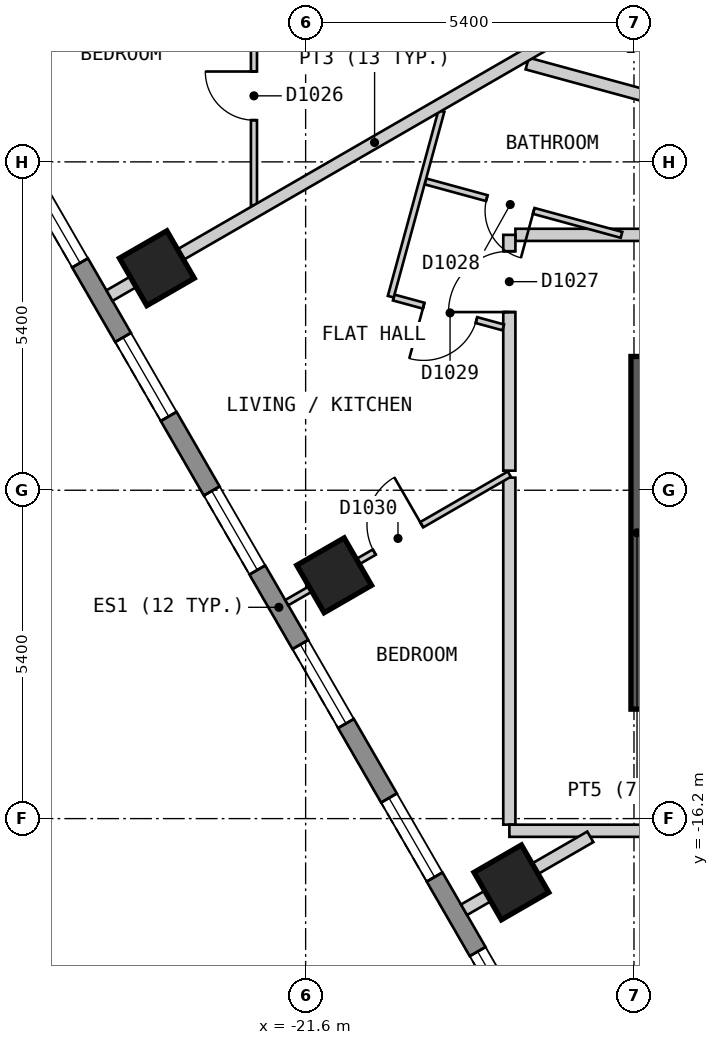
"""IFC4 building model, lengths in metres.
Left out: names, types, materials, properties, quantities, classifications, styles, units other than length and angle.
Written with IfcOpenShell. Run it as: python <this file> out.ifc"""

import sys

from ifc_helpers import new_model, si_unit, direction, frame, frame_2d, origin, origin_2d, place, context, subcontext, project, spatial, polyline, rectangle, outline, extrude, element, fill, save


model = new_model("IFC4")
c1 = context("Model", 3, precision=1e-05, world=origin(), true_north=direction((0.0, 1.0)))
c2 = subcontext(c1, "Body", "Model", "MODEL_VIEW")
j1 = project(units=[si_unit("LENGTHUNIT", "METRE"), si_unit("PLANEANGLEUNIT", "RADIAN")], contexts=[c1])
p1 = place(None, origin())
s1 = spatial("IfcSite", under=j1, at=p1, CompositionType="ELEMENT")
p2 = place(p1, origin())
s2 = spatial("IfcBuilding", under=s1, at=p2, CompositionType="ELEMENT")
p3 = place(p2, frame((0.0, 0.0, 126.6)))
s3 = spatial("IfcBuildingStorey", under=s2, at=p3, CompositionType="ELEMENT", Elevation=126.6)
for number, where, z_axis, x_axis in (
    (1, (-24.047, -7.149, 0.0), (0.0, 0.0, 1.0), (0.5, -0.866, 0.0)),
    (2, (-21.131, -12.199, 0.0), (0.0, 0.0, 1.0), (0.5, -0.866, 0.0)),
    (3, (-18.216, -17.249, 0.0), (0.0, 0.0, 1.0), (0.5, -0.866, 0.0)),
):
    element("IfcColumn", number, at=place(p3, frame(where, z_axis=z_axis, x_axis=x_axis)), inside=s3, PredefinedType="COLUMN", context=c2, shape_type="SweptSolid", body=[
        extrude(rectangle(XDim=0.9, YDim=0.9, at=origin_2d()), origin(), (0.0, 0.0, 1.0), 3.0),
    ])
p4 = place(p3, frame((-28.218, -2.025, 0.0), z_axis=(0.0, 0.0, 1.0), x_axis=(0.500017503135, -0.866015298109, 0.0)))
e4 = element("IfcWall", 4, at=p4, inside=s3, PredefinedType="SOLIDWALL", context=c2, shape_type="SweptSolid", body=[
    extrude(outline(polyline([(0.0, -0.15), (24.711, -0.15), (24.631, 0.15), (0.08, 0.15), (0.0, -0.15)])), origin(), (0.0, 0.0, 1.0), 2.7),
])
p5 = place(p4, frame((1.4, 0.0, 0.15)))
e5 = element("IfcOpeningElement", 5, at=p5, cuts=e4, PredefinedType="OPENING", context=c2, shape_type="SweptSolid", body=[
    extrude(rectangle(XDim=1.5, YDim=2.1, at=frame_2d((0.75, 1.05))), frame((0.0, 0.16, 0.0), z_axis=(0.0, -1.0, 0.0), x_axis=(1.0, 0.0, 0.0)), (0.0, 0.0, 1.0), 0.32),
])
p6 = place(p4, frame((4.316, 0.0, 0.15)))
e6 = element("IfcOpeningElement", 6, at=p6, cuts=e4, PredefinedType="OPENING", context=c2, shape_type="SweptSolid", body=[
    extrude(rectangle(XDim=1.5, YDim=2.1, at=frame_2d((0.75, 1.05))), frame((0.0, 0.16, 0.0), z_axis=(0.0, -1.0, 0.0), x_axis=(1.0, 0.0, 0.0)), (0.0, 0.0, 1.0), 0.32),
])
p7 = place(p4, frame((7.231, 0.0, 0.15)))
e7 = element("IfcOpeningElement", 7, at=p7, cuts=e4, PredefinedType="OPENING", context=c2, shape_type="SweptSolid", body=[
    extrude(rectangle(XDim=1.5, YDim=2.1, at=frame_2d((0.75, 1.05))), frame((0.0, 0.16, 0.0), z_axis=(0.0, -1.0, 0.0), x_axis=(1.0, 0.0, 0.0)), (0.0, 0.0, 1.0), 0.32),
])
p8 = place(p4, frame((10.147, 0.0, 0.15)))
e8 = element("IfcOpeningElement", 8, at=p8, cuts=e4, PredefinedType="OPENING", context=c2, shape_type="SweptSolid", body=[
    extrude(rectangle(XDim=1.5, YDim=2.1, at=frame_2d((0.75, 1.05))), frame((0.0, 0.16, 0.0), z_axis=(0.0, -1.0, 0.0), x_axis=(1.0, 0.0, 0.0)), (0.0, 0.0, 1.0), 0.32),
])
p9 = place(p4, frame((13.062, 0.0, 0.15)))
e9 = element("IfcOpeningElement", 9, at=p9, cuts=e4, PredefinedType="OPENING", context=c2, shape_type="SweptSolid", body=[
    extrude(rectangle(XDim=1.5, YDim=2.1, at=frame_2d((0.75, 1.05))), frame((0.0, 0.16, 0.0), z_axis=(0.0, -1.0, 0.0), x_axis=(1.0, 0.0, 0.0)), (0.0, 0.0, 1.0), 0.32),
])
p10 = place(p4, frame((15.977, 0.0, 0.15)))
e10 = element("IfcOpeningElement", 10, at=p10, cuts=e4, PredefinedType="OPENING", context=c2, shape_type="SweptSolid", body=[
    extrude(rectangle(XDim=1.5, YDim=2.1, at=frame_2d((0.75, 1.05))), frame((0.0, 0.16, 0.0), z_axis=(0.0, -1.0, 0.0), x_axis=(1.0, 0.0, 0.0)), (0.0, 0.0, 1.0), 0.32),
])
p11 = place(p4, frame((18.893, 0.0, 0.15)))
e11 = element("IfcOpeningElement", 11, at=p11, cuts=e4, PredefinedType="OPENING", context=c2, shape_type="SweptSolid", body=[
    extrude(rectangle(XDim=1.5, YDim=2.1, at=frame_2d((0.75, 1.05))), frame((0.0, 0.16, 0.0), z_axis=(0.0, -1.0, 0.0), x_axis=(1.0, 0.0, 0.0)), (0.0, 0.0, 1.0), 0.32),
])
p12 = place(p4, frame((21.809, 0.0, 0.15)))
e12 = element("IfcOpeningElement", 12, at=p12, cuts=e4, PredefinedType="OPENING", context=c2, shape_type="SweptSolid", body=[
    extrude(rectangle(XDim=1.5, YDim=2.1, at=frame_2d((0.75, 1.05))), frame((0.0, 0.16, 0.0), z_axis=(0.0, -1.0, 0.0), x_axis=(1.0, 0.0, 0.0)), (0.0, 0.0, 1.0), 0.32),
])
p13 = place(p3, frame((-18.25, -10.593, 0.0), z_axis=(0.0, 0.0, 1.0), x_axis=(0.0, -1.0, 0.0)))
e13 = element("IfcWall", 13, at=p13, inside=s3, PredefinedType="PARTITIONING", context=c2, shape_type="SweptSolid", body=[
    extrude(rectangle(XDim=5.706, YDim=0.2, at=frame_2d((2.853, 0.0))), origin(), (0.0, 0.0, 1.0), 2.7),
])
p14 = place(p3, frame((-18.15, -6.6, 0.0), z_axis=(0.0, 0.0, 1.0), x_axis=(1.0, 0.0, 0.0)))
e14 = element("IfcWall", 14, at=p14, inside=s3, PredefinedType="PARTITIONING", context=c2, shape_type="SweptSolid", body=[
    extrude(rectangle(XDim=2.55, YDim=0.2, at=frame_2d((1.275, 0.0))), origin(), (0.0, 0.0, 1.0), 2.7),
])
p15 = place(p3, frame((-18.249, -16.4, 0.0), z_axis=(0.0, 0.0, 1.0), x_axis=(1.0, 0.0, 0.0)))
e15 = element("IfcWall", 15, at=p15, inside=s3, PredefinedType="PARTITIONING", context=c2, shape_type="SweptSolid", body=[
    extrude(rectangle(XDim=2.749, YDim=0.2, at=frame_2d((1.375, 0.0))), origin(), (0.0, 0.0, 1.0), 2.7),
])
p16 = place(p3, frame((-18.25, -10.478, 0.0), z_axis=(0.0, 0.0, 1.0), x_axis=(0.0, 1.0, 0.0)))
e16 = element("IfcWall", 16, at=p16, inside=s3, PredefinedType="PARTITIONING", context=c2, shape_type="SweptSolid", body=[
    extrude(rectangle(XDim=3.878, YDim=0.2, at=frame_2d((1.939, 0.0))), origin(), (0.0, 0.0, 1.0), 2.7),
])
p17 = place(p16, frame((2.608, 0.0, 0.0)))
e17 = element("IfcOpeningElement", 17, at=p17, cuts=e16, PredefinedType="OPENING", context=c2, shape_type="SweptSolid", body=[
    extrude(rectangle(XDim=1.0, YDim=2.1, at=frame_2d((0.5, 1.05))), frame((0.0, 0.11, 0.0), z_axis=(0.0, -1.0, 0.0), x_axis=(1.0, 0.0, 0.0)), (0.0, 0.0, 1.0), 0.22),
])
p18 = place(p3, frame((-19.631, -5.721, 0.0), z_axis=(0.0, 0.0, 1.0), x_axis=(0.964816035809, -0.262925877475, 0.0)))
e18 = element("IfcWall", 18, at=p18, inside=s3, PredefinedType="PARTITIONING", context=c2, shape_type="SweptSolid", body=[
    extrude(rectangle(XDim=3.344, YDim=0.1, at=frame_2d((1.672, 0.0))), origin(), (0.0, 0.0, 1.0), 2.7),
])
p19 = place(p18, frame((1.047, 0.0, 0.0)))
e19 = element("IfcOpeningElement", 19, at=p19, cuts=e18, PredefinedType="OPENING", context=c2, shape_type="SweptSolid", body=[
    extrude(rectangle(XDim=0.8, YDim=2.1, at=frame_2d((0.4, 1.05))), frame((0.0, 0.06, 0.0), z_axis=(0.0, -1.0, 0.0), x_axis=(1.0, 0.0, 0.0)), (0.0, 0.0, 1.0), 0.12),
])
p20 = place(p3, frame((-20.151, -7.631, 0.0), z_axis=(0.0, 0.0, 1.0), x_axis=(0.964784947449, -0.263039930765, 0.0)))
e20 = element("IfcWall", 20, at=p20, inside=s3, PredefinedType="PARTITIONING", context=c2, shape_type="SweptSolid", body=[
    extrude(rectangle(XDim=1.866, YDim=0.1, at=frame_2d((0.933, 0.0))), origin(), (0.0, 0.0, 1.0), 2.7),
])
p21 = place(p20, frame((0.51, 0.0, 0.0)))
e21 = element("IfcOpeningElement", 21, at=p21, cuts=e20, PredefinedType="OPENING", context=c2, shape_type="SweptSolid", body=[
    extrude(rectangle(XDim=0.9, YDim=2.1, at=frame_2d((0.45, 1.05))), frame((0.0, 0.06, 0.0), z_axis=(0.0, -1.0, 0.0), x_axis=(1.0, 0.0, 0.0)), (0.0, 0.0, 1.0), 0.12),
])
p22 = place(p3, frame((-20.2, -7.617, 0.0), z_axis=(0.0, 0.0, 1.0), x_axis=(0.263150035392, 0.964754921663, 0.0)))
e22 = element("IfcWall", 22, at=p22, inside=s3, PredefinedType="PARTITIONING", context=c2, shape_type="SweptSolid", body=[
    extrude(rectangle(XDim=3.166, YDim=0.1, at=frame_2d((1.583, 0.0))), origin(), (0.0, 0.0, 1.0), 2.7),
])
p23 = place(p3, frame((-22.45, -6.112, 0.0), z_axis=(0.0, 0.0, 1.0), x_axis=(0.0, 1.0, 0.0)))
e23 = element("IfcWall", 23, at=p23, inside=s3, PredefinedType="PARTITIONING", context=c2, shape_type="SweptSolid", body=[
    extrude(rectangle(XDim=3.712, YDim=0.1, at=frame_2d((1.856, 0.0))), origin(), (0.0, 0.0, 1.0), 2.7),
])
p24 = place(p23, frame((1.398, 0.0, 0.0)))
e24 = element("IfcOpeningElement", 24, at=p24, cuts=e23, PredefinedType="OPENING", context=c2, shape_type="SweptSolid", body=[
    extrude(rectangle(XDim=0.8, YDim=2.1, at=frame_2d((0.4, 1.05))), frame((0.0, 0.06, 0.0), z_axis=(0.0, -1.0, 0.0), x_axis=(1.0, 0.0, 0.0)), (0.0, 0.0, 1.0), 0.12),
])
p25 = place(p3, frame((-21.911, -12.649, 0.0), z_axis=(0.0, 0.0, 1.0), x_axis=(0.865984571374, 0.500070717141, 0.0)))
e25 = element("IfcWall", 25, at=p25, inside=s3, PredefinedType="PARTITIONING", context=c2, shape_type="SweptSolid", body=[
    extrude(rectangle(XDim=4.228, YDim=0.1, at=frame_2d((2.114, 0.0))), origin(), (0.0, 0.0, 1.0), 2.7),
])
p26 = place(p25, frame((1.663, 0.0, 0.0)))
e26 = element("IfcOpeningElement", 26, at=p26, cuts=e25, PredefinedType="OPENING", context=c2, shape_type="SweptSolid", body=[
    extrude(rectangle(XDim=0.9, YDim=2.1, at=frame_2d((0.45, 1.05))), frame((0.0, 0.06, 0.0), z_axis=(0.0, -1.0, 0.0), x_axis=(1.0, 0.0, 0.0)), (0.0, 0.0, 1.0), 0.12),
])
p27 = place(p3, frame((-17.956, -3.783, 0.0), z_axis=(0.0, 0.0, 1.0), x_axis=(0.964815336827, -0.2629284424, 0.0)))
e27 = element("IfcWall", 27, at=p27, inside=s3, PredefinedType="PARTITIONING", context=c2, shape_type="SweptSolid", body=[
    extrude(rectangle(XDim=2.514, YDim=0.2, at=frame_2d((1.257, 0.0))), origin(), (0.0, 0.0, 1.0), 2.7),
])
p28 = place(p3, frame((-18.995, -17.699, 0.0), z_axis=(0.0, 0.0, 1.0), x_axis=(0.86607371389, 0.499916315105, 0.0)))
e28 = element("IfcWall", 28, at=p28, inside=s3, PredefinedType="PARTITIONING", context=c2, shape_type="SweptSolid", body=[
    extrude(rectangle(XDim=2.398, YDim=0.2, at=frame_2d((1.199, 0.0))), origin(), (0.0, 0.0, 1.0), 2.7),
])
p29 = place(p3, frame((-24.826, -7.599, 0.0), z_axis=(0.0, 0.0, 1.0), x_axis=(0.86599621094, 0.500050560081, 0.0)))
e29 = element("IfcWall", 29, at=p29, inside=s3, PredefinedType="PARTITIONING", context=c2, shape_type="SweptSolid", body=[
    extrude(rectangle(XDim=10.069, YDim=0.2, at=frame_2d((5.035, 0.0))), origin(), (0.0, 0.0, 1.0), 2.7),
])
p30 = place(p3, frame((-16.15, -14.4, 0.0), z_axis=(0.0, 0.0, 1.0), x_axis=(0.0, 1.0, 0.0)))
e30 = element("IfcWall", 30, at=p30, inside=s3, PredefinedType="SOLIDWALL", context=c2, shape_type="SweptSolid", body=[
    extrude(rectangle(XDim=5.8, YDim=0.2, at=frame_2d((2.9, 0.0))), origin(), (0.0, 0.0, 1.0), 2.7),
])
p31 = place(p6, origin())
e31 = element("IfcWindow", 31, at=p31, inside=s3, PartitioningType="SINGLE_PANEL", PredefinedType="WINDOW", context=c2, shape_type="SweptSolid", body=[
    extrude(rectangle(XDim=1.5, YDim=2.1, at=frame_2d((0.75, 1.05))), frame((0.0, 0.03, 0.0), z_axis=(0.0, -1.0, 0.0), x_axis=(1.0, 0.0, 0.0)), (0.0, 0.0, 1.0), 0.06),
])
fill(e6, e31)
p32 = place(p7, origin())
e32 = element("IfcWindow", 32, at=p32, inside=s3, PartitioningType="SINGLE_PANEL", PredefinedType="WINDOW", context=c2, shape_type="SweptSolid", body=[
    extrude(rectangle(XDim=1.5, YDim=2.1, at=frame_2d((0.75, 1.05))), frame((0.0, 0.03, 0.0), z_axis=(0.0, -1.0, 0.0), x_axis=(1.0, 0.0, 0.0)), (0.0, 0.0, 1.0), 0.06),
])
fill(e7, e32)
p33 = place(p8, origin())
e33 = element("IfcWindow", 33, at=p33, inside=s3, PartitioningType="SINGLE_PANEL", PredefinedType="WINDOW", context=c2, shape_type="SweptSolid", body=[
    extrude(rectangle(XDim=1.5, YDim=2.1, at=frame_2d((0.75, 1.05))), frame((0.0, 0.03, 0.0), z_axis=(0.0, -1.0, 0.0), x_axis=(1.0, 0.0, 0.0)), (0.0, 0.0, 1.0), 0.06),
])
fill(e8, e33)
p34 = place(p9, origin())
e34 = element("IfcWindow", 34, at=p34, inside=s3, PartitioningType="SINGLE_PANEL", PredefinedType="WINDOW", context=c2, shape_type="SweptSolid", body=[
    extrude(rectangle(XDim=1.5, YDim=2.1, at=frame_2d((0.75, 1.05))), frame((0.0, 0.03, 0.0), z_axis=(0.0, -1.0, 0.0), x_axis=(1.0, 0.0, 0.0)), (0.0, 0.0, 1.0), 0.06),
])
fill(e9, e34)
p35 = place(p10, origin())
e35 = element("IfcWindow", 35, at=p35, inside=s3, PartitioningType="SINGLE_PANEL", PredefinedType="WINDOW", context=c2, shape_type="SweptSolid", body=[
    extrude(rectangle(XDim=1.5, YDim=2.1, at=frame_2d((0.75, 1.05))), frame((0.0, 0.03, 0.0), z_axis=(0.0, -1.0, 0.0), x_axis=(1.0, 0.0, 0.0)), (0.0, 0.0, 1.0), 0.06),
])
fill(e10, e35)
p36 = place(p11, origin())
e36 = element("IfcWindow", 36, at=p36, inside=s3, PartitioningType="SINGLE_PANEL", PredefinedType="WINDOW", context=c2, shape_type="SweptSolid", body=[
    extrude(rectangle(XDim=1.5, YDim=2.1, at=frame_2d((0.75, 1.05))), frame((0.0, 0.03, 0.0), z_axis=(0.0, -1.0, 0.0), x_axis=(1.0, 0.0, 0.0)), (0.0, 0.0, 1.0), 0.06),
])
fill(e11, e36)
p37 = place(p24, origin())
e37 = element("IfcDoor", 37, at=p37, inside=s3, OperationType="SINGLE_SWING_RIGHT", PredefinedType="DOOR", context=c2, shape_type="SweptSolid", body=[
    extrude(rectangle(XDim=0.8, YDim=2.1, at=frame_2d((0.4, 1.05))), frame((0.0, 0.025, 0.0), z_axis=(0.0, -1.0, 0.0), x_axis=(1.0, 0.0, 0.0)), (0.0, 0.0, 1.0), 0.05),
])
fill(e24, e37)
p38 = place(p17, origin())
e38 = element("IfcDoor", 38, at=p38, inside=s3, OperationType="SINGLE_SWING_LEFT", PredefinedType="DOOR", context=c2, shape_type="SweptSolid", body=[
    extrude(rectangle(XDim=1.0, YDim=2.1, at=frame_2d((0.5, 1.05))), frame((0.0, 0.025, 0.0), z_axis=(0.0, -1.0, 0.0), x_axis=(1.0, 0.0, 0.0)), (0.0, 0.0, 1.0), 0.05),
])
fill(e17, e38)
p39 = place(p19, origin())
e39 = element("IfcDoor", 39, at=p39, inside=s3, OperationType="SINGLE_SWING_RIGHT", PredefinedType="DOOR", context=c2, shape_type="SweptSolid", body=[
    extrude(rectangle(XDim=0.8, YDim=2.1, at=frame_2d((0.4, 1.05))), frame((0.0, 0.025, 0.0), z_axis=(0.0, -1.0, 0.0), x_axis=(1.0, 0.0, 0.0)), (0.0, 0.0, 1.0), 0.05),
])
fill(e19, e39)
p40 = place(p21, origin())
e40 = element("IfcDoor", 40, at=p40, inside=s3, OperationType="SINGLE_SWING_LEFT", PredefinedType="DOOR", context=c2, shape_type="SweptSolid", body=[
    extrude(rectangle(XDim=0.9, YDim=2.1, at=frame_2d((0.45, 1.05))), frame((0.0, 0.025, 0.0), z_axis=(0.0, -1.0, 0.0), x_axis=(1.0, 0.0, 0.0)), (0.0, 0.0, 1.0), 0.05),
])
fill(e21, e40)
p41 = place(p26, origin())
e41 = element("IfcDoor", 41, at=p41, inside=s3, OperationType="SINGLE_SWING_RIGHT", PredefinedType="DOOR", context=c2, shape_type="SweptSolid", body=[
    extrude(rectangle(XDim=0.9, YDim=2.1, at=frame_2d((0.45, 1.05))), frame((0.0, 0.025, 0.0), z_axis=(0.0, -1.0, 0.0), x_axis=(1.0, 0.0, 0.0)), (0.0, 0.0, 1.0), 0.05),
])
fill(e26, e41)
save(model, sys.argv[1])
